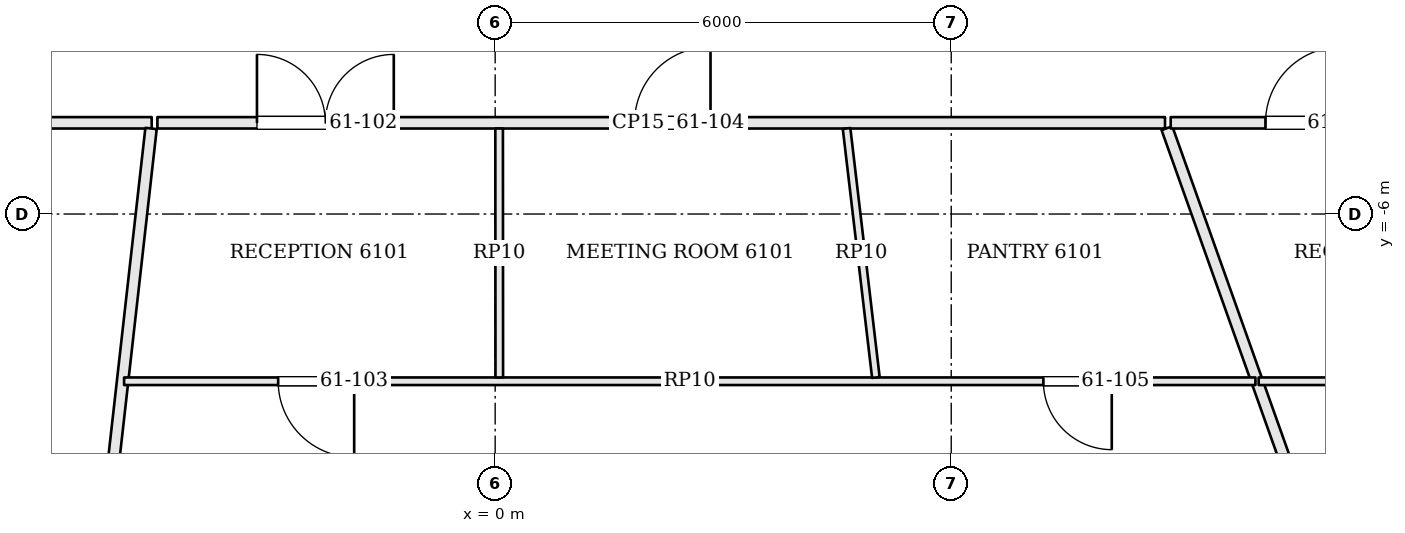
"""IFC4 building model, lengths in metres.
Left out: names, types, materials, properties, quantities, classifications, styles, units other than length and angle.
Written with IfcOpenShell. Run it as: python <this file> out.ifc"""

import sys

from ifc_helpers import new_model, si_unit, direction, frame, frame_2d, origin, place, context, subcontext, project, spatial, rectangle, extrude, element, fill, save


model = new_model("IFC4")
c1 = context("Model", 3, precision=1e-05, world=origin(), true_north=direction((0.0, 1.0)))
c2 = subcontext(c1, "Body", "Model", "MODEL_VIEW")
j1 = project(units=[si_unit("LENGTHUNIT", "METRE"), si_unit("PLANEANGLEUNIT", "RADIAN")], contexts=[c1])
p1 = place(None, origin())
s1 = spatial("IfcSite", under=j1, at=p1, CompositionType="ELEMENT")
p2 = place(p1, origin())
s2 = spatial("IfcBuilding", under=s1, at=p2, CompositionType="ELEMENT")
p3 = place(p2, frame((0.0, 0.0, 248.7)))
s3 = spatial("IfcBuildingStorey", under=s2, at=p3, CompositionType="ELEMENT", Elevation=248.7)
p4 = place(p3, frame((-14.725, -4.8, 0.0), z_axis=(0.0, 0.0, 1.0), x_axis=(1.0, 0.0, 0.0)))
e1 = element("IfcWall", 1, at=p4, inside=s3, PredefinedType="PARTITIONING", context=c2, shape_type="SweptSolid", body=[
    extrude(rectangle(XDim=10.206, YDim=0.15, at=frame_2d((5.103, 0.0))), origin(), (0.0, 0.0, 1.0), 3.084),
])
p5 = place(p4, frame((3.626, 0.0, 0.0)))
e2 = element("IfcOpeningElement", 2, at=p5, cuts=e1, PredefinedType="OPENING", context=c2, shape_type="SweptSolid", body=[
    extrude(rectangle(XDim=1.8, YDim=2.1, at=frame_2d((0.9, 1.05))), frame((0.0, 0.085, 0.0), z_axis=(0.0, -1.0, 0.0), x_axis=(1.0, 0.0, 0.0)), (0.0, 0.0, 1.0), 0.17),
])
p6 = place(p3, frame((-6.161, -19.377, 0.0), z_axis=(0.0, 0.0, 1.0), x_axis=(0.111927750306, 0.99371634721, 0.0)))
e3 = element("IfcWall", 3, at=p6, inside=s3, PredefinedType="PARTITIONING", context=c2, shape_type="SweptSolid", body=[
    extrude(rectangle(XDim=14.595, YDim=0.15, at=frame_2d((7.297, 0.0))), origin(), (0.0, 0.0, 1.0), 3.084),
])
p7 = place(p3, frame((-4.444, -4.8, 0.0), z_axis=(0.0, 0.0, 1.0), x_axis=(1.0, 0.0, 0.0)))
e4 = element("IfcWall", 4, at=p7, inside=s3, PredefinedType="PARTITIONING", context=c2, shape_type="SweptSolid", body=[
    extrude(rectangle(XDim=13.256, YDim=0.15, at=frame_2d((6.628, 0.0))), origin(), (0.0, 0.0, 1.0), 3.084),
])
p8 = place(p7, frame((1.31, 0.0, 0.0)))
e5 = element("IfcOpeningElement", 5, at=p8, cuts=e4, PredefinedType="OPENING", context=c2, shape_type="SweptSolid", body=[
    extrude(rectangle(XDim=1.8, YDim=2.1, at=frame_2d((0.9, 1.05))), frame((0.0, 0.085, 0.0), z_axis=(0.0, -1.0, 0.0), x_axis=(1.0, 0.0, 0.0)), (0.0, 0.0, 1.0), 0.17),
])
p9 = place(p7, frame((6.277, 0.0, 0.0)))
e6 = element("IfcOpeningElement", 6, at=p9, cuts=e4, PredefinedType="OPENING", context=c2, shape_type="SweptSolid", body=[
    extrude(rectangle(XDim=1.0, YDim=2.4, at=frame_2d((0.5, 1.2))), frame((0.0, 0.085, 0.0), z_axis=(0.0, -1.0, 0.0), x_axis=(1.0, 0.0, 0.0)), (0.0, 0.0, 1.0), 0.17),
])
p10 = place(p3, frame((13.483, -17.916, 0.0), z_axis=(0.0, 0.0, 1.0), x_axis=(-0.335482994468, 0.942046262358, 0.0)))
e7 = element("IfcWall", 7, at=p10, inside=s3, PredefinedType="PARTITIONING", context=c2, shape_type="SweptSolid", body=[
    extrude(rectangle(XDim=13.848, YDim=0.15, at=frame_2d((6.924, 0.0))), origin(), (0.0, 0.0, 1.0), 3.084),
])
p11 = place(p3, frame((8.887, -4.8, 0.0), z_axis=(0.0, 0.0, 1.0), x_axis=(1.0, 0.0, 0.0)))
e8 = element("IfcWall", 8, at=p11, inside=s3, PredefinedType="PARTITIONING", context=c2, shape_type="SweptSolid", body=[
    extrude(rectangle(XDim=5.913, YDim=0.15, at=frame_2d((2.956, 0.0))), origin(), (0.0, 0.0, 1.0), 3.084),
])
p12 = place(p11, frame((1.247, 0.0, 0.0)))
e9 = element("IfcOpeningElement", 9, at=p12, cuts=e8, PredefinedType="OPENING", context=c2, shape_type="SweptSolid", body=[
    extrude(rectangle(XDim=1.0, YDim=2.1, at=frame_2d((0.5, 1.05))), frame((0.0, 0.085, 0.0), z_axis=(0.0, -1.0, 0.0), x_axis=(1.0, 0.0, 0.0)), (0.0, 0.0, 1.0), 0.17),
])
p13 = place(p11, frame((4.4, 0.0, 0.0)))
e10 = element("IfcOpeningElement", 10, at=p13, cuts=e8, PredefinedType="OPENING", context=c2, shape_type="SweptSolid", body=[
    extrude(rectangle(XDim=1.0, YDim=2.4, at=frame_2d((0.5, 1.2))), frame((0.0, 0.085, 0.0), z_axis=(0.0, -1.0, 0.0), x_axis=(1.0, 0.0, 0.0)), (0.0, 0.0, 1.0), 0.17),
])
p14 = place(p3, frame((10.002, -8.2, 0.0), z_axis=(0.0, 0.0, 1.0), x_axis=(-1.0, 0.0, 0.0)))
e11 = element("IfcWall", 11, at=p14, inside=s3, PredefinedType="PARTITIONING", context=c2, shape_type="SweptSolid", body=[
    extrude(rectangle(XDim=14.884, YDim=0.1, at=frame_2d((7.442, 0.0))), origin(), (0.0, 0.0, 1.0), 3.084),
])
p15 = place(p14, frame((11.857, 0.0, 0.0)))
e12 = element("IfcOpeningElement", 12, at=p15, cuts=e11, PredefinedType="OPENING", context=c2, shape_type="SweptSolid", body=[
    extrude(rectangle(XDim=1.0, YDim=2.1, at=frame_2d((0.5, 1.05))), frame((0.0, 0.06, 0.0), z_axis=(0.0, -1.0, 0.0), x_axis=(1.0, 0.0, 0.0)), (0.0, 0.0, 1.0), 0.12),
])
p16 = place(p14, frame((1.89, 0.0, 0.0)))
e13 = element("IfcOpeningElement", 13, at=p16, cuts=e11, PredefinedType="OPENING", context=c2, shape_type="SweptSolid", body=[
    extrude(rectangle(XDim=0.9, YDim=2.1, at=frame_2d((0.45, 1.05))), frame((0.0, 0.06, 0.0), z_axis=(0.0, -1.0, 0.0), x_axis=(1.0, 0.0, 0.0)), (0.0, 0.0, 1.0), 0.12),
])
p17 = place(p3, frame((0.052, -4.875, 0.0), z_axis=(0.0, 0.0, 1.0), x_axis=(0.000596391723, -0.999999822158, 0.0)))
e14 = element("IfcWall", 14, at=p17, inside=s3, PredefinedType="PARTITIONING", context=c2, shape_type="SweptSolid", body=[
    extrude(rectangle(XDim=3.275, YDim=0.1, at=frame_2d((1.637, 0.0))), origin(), (0.0, 0.0, 1.0), 3.084),
])
p18 = place(p3, frame((4.623, -4.875, 0.0), z_axis=(0.0, 0.0, 1.0), x_axis=(0.116871308631, -0.993147067266, 0.0)))
e15 = element("IfcWall", 15, at=p18, inside=s3, PredefinedType="PARTITIONING", context=c2, shape_type="SweptSolid", body=[
    extrude(rectangle(XDim=3.299, YDim=0.1, at=frame_2d((1.649, 0.0))), origin(), (0.0, 0.0, 1.0), 3.084),
])
p19 = place(p3, frame((18.15, -8.2, 0.0), z_axis=(0.0, 0.0, 1.0), x_axis=(-1.0, 0.0, 0.0)))
e16 = element("IfcWall", 16, at=p19, inside=s3, PredefinedType="PARTITIONING", context=c2, shape_type="SweptSolid", body=[
    extrude(rectangle(XDim=8.105, YDim=0.1, at=frame_2d((4.053, 0.0))), origin(), (0.0, 0.0, 1.0), 3.084),
])
p20 = place(p19, frame((5.173, 0.0, 0.0)))
e17 = element("IfcOpeningElement", 17, at=p20, cuts=e16, PredefinedType="OPENING", context=c2, shape_type="SweptSolid", body=[
    extrude(rectangle(XDim=1.0, YDim=2.1, at=frame_2d((0.5, 1.05))), frame((0.0, 0.06, 0.0), z_axis=(0.0, -1.0, 0.0), x_axis=(1.0, 0.0, 0.0)), (0.0, 0.0, 1.0), 0.12),
])
p21 = place(p8, origin())
e18 = element("IfcDoor", 18, at=p21, inside=s3, OperationType="DOUBLE_DOOR_SINGLE_SWING", PredefinedType="DOOR", context=c2, shape_type="SweptSolid", body=[
    extrude(rectangle(XDim=1.8, YDim=2.1, at=frame_2d((0.9, 1.05))), frame((0.0, 0.025, 0.0), z_axis=(0.0, -1.0, 0.0), x_axis=(1.0, 0.0, 0.0)), (0.0, 0.0, 1.0), 0.05),
])
fill(e5, e18)
p22 = place(p15, origin())
e19 = element("IfcDoor", 19, at=p22, inside=s3, OperationType="SINGLE_SWING_LEFT", PredefinedType="DOOR", context=c2, shape_type="SweptSolid", body=[
    extrude(rectangle(XDim=1.0, YDim=2.1, at=frame_2d((0.5, 1.05))), frame((0.0, 0.025, 0.0), z_axis=(0.0, -1.0, 0.0), x_axis=(1.0, 0.0, 0.0)), (0.0, 0.0, 1.0), 0.05),
])
fill(e12, e19)
p23 = place(p9, origin())
e20 = element("IfcDoor", 20, at=p23, inside=s3, OperationType="SINGLE_SWING_RIGHT", PredefinedType="DOOR", context=c2, shape_type="SweptSolid", body=[
    extrude(rectangle(XDim=1.0, YDim=2.4, at=frame_2d((0.5, 1.2))), frame((0.0, 0.025, 0.0), z_axis=(0.0, -1.0, 0.0), x_axis=(1.0, 0.0, 0.0)), (0.0, 0.0, 1.0), 0.05),
])
fill(e6, e20)
p24 = place(p16, origin())
e21 = element("IfcDoor", 21, at=p24, inside=s3, OperationType="SINGLE_SWING_LEFT", PredefinedType="DOOR", context=c2, shape_type="SweptSolid", body=[
    extrude(rectangle(XDim=0.9, YDim=2.1, at=frame_2d((0.45, 1.05))), frame((0.0, 0.025, 0.0), z_axis=(0.0, -1.0, 0.0), x_axis=(1.0, 0.0, 0.0)), (0.0, 0.0, 1.0), 0.05),
])
fill(e13, e21)
p25 = place(p12, origin())
e22 = element("IfcDoor", 22, at=p25, inside=s3, OperationType="SINGLE_SWING_RIGHT", PredefinedType="DOOR", context=c2, shape_type="SweptSolid", body=[
    extrude(rectangle(XDim=1.0, YDim=2.1, at=frame_2d((0.5, 1.05))), frame((0.0, 0.025, 0.0), z_axis=(0.0, -1.0, 0.0), x_axis=(1.0, 0.0, 0.0)), (0.0, 0.0, 1.0), 0.05),
])
fill(e9, e22)
save(model, sys.argv[1])
